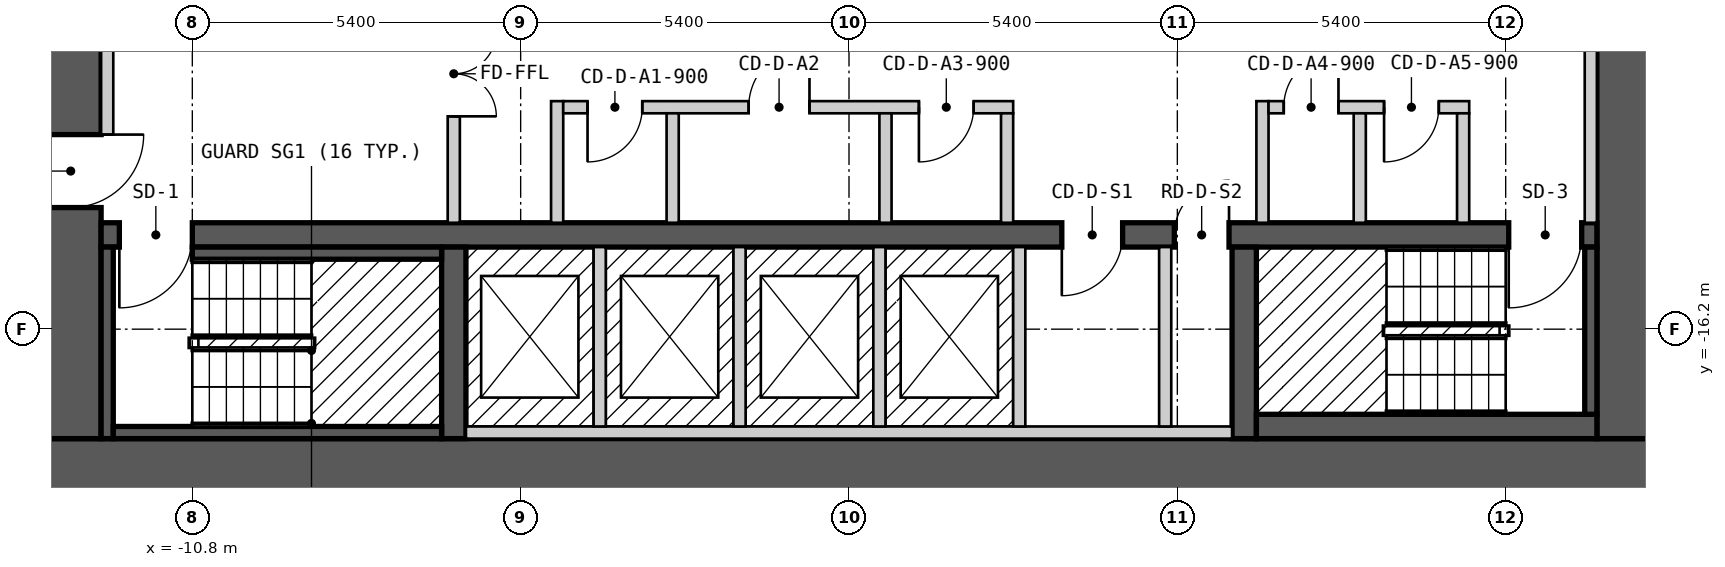
"""IFC4 building model, lengths in metres.
Left out: names, types, materials, properties, quantities, classifications, styles, units other than length and angle.
Written with IfcOpenShell. Run it as: python <this file> out.ifc"""

import sys

from ifc_helpers import new_model, si_unit, direction, frame, frame_2d, origin, place, context, subcontext, project, spatial, rectangle, extrude, element, fill, save


model = new_model("IFC4")
c1 = context("Model", 3, precision=1e-05, world=origin(), true_north=direction((0.0, 1.0)))
c2 = subcontext(c1, "Body", "Model", "MODEL_VIEW")
j1 = project(units=[si_unit("LENGTHUNIT", "METRE"), si_unit("PLANEANGLEUNIT", "RADIAN")], contexts=[c1])
p1 = place(None, origin())
s1 = spatial("IfcSite", under=j1, at=p1, CompositionType="ELEMENT")
p2 = place(p1, origin())
s2 = spatial("IfcBuilding", under=s1, at=p2, CompositionType="ELEMENT")
p3 = place(p2, frame((0.0, 0.0, 93.0)))
s3 = spatial("IfcBuildingStorey", under=s2, at=p3, CompositionType="ELEMENT", Elevation=93.0)
p4 = place(p3, frame((-13.3, -18.5, 0.0), z_axis=(0.0, 0.0, 1.0), x_axis=(1.0, 0.0, 0.0)))
e1 = element("IfcWall", 1, at=p4, inside=s3, PredefinedType="SHEAR", context=c2, shape_type="SweptSolid", body=[
    extrude(rectangle(XDim=26.6, YDim=1.0, at=frame_2d((13.3, 0.0))), origin(), (0.0, 0.0, 1.0), 2.7),
])
p5 = place(p3, frame((-12.8, -18.0, 0.0), z_axis=(0.0, 0.0, 1.0), x_axis=(0.0, 1.0, 0.0)))
e2 = element("IfcWall", 2, at=p5, inside=s3, PredefinedType="SHEAR", context=c2, shape_type="SweptSolid", body=[
    extrude(rectangle(XDim=12.0, YDim=1.0, at=frame_2d((6.0, 0.0))), origin(), (0.0, 0.0, 1.0), 2.7),
])
p6 = place(p5, frame((3.8, 0.0, 0.0)))
e3 = element("IfcOpeningElement", 3, at=p6, cuts=e2, PredefinedType="OPENING", context=c2, shape_type="SweptSolid", body=[
    extrude(rectangle(XDim=1.2, YDim=2.1, at=frame_2d((0.6, 1.05))), frame((0.0, 0.51, 0.0), z_axis=(0.0, -1.0, 0.0), x_axis=(1.0, 0.0, 0.0)), (0.0, 0.0, 1.0), 1.02),
])
p7 = place(p3, frame((12.8, -18.0, 0.0), z_axis=(0.0, 0.0, 1.0), x_axis=(0.0, 1.0, 0.0)))
e4 = element("IfcWall", 4, at=p7, inside=s3, PredefinedType="SHEAR", context=c2, shape_type="SweptSolid", body=[
    extrude(rectangle(XDim=12.0, YDim=1.0, at=frame_2d((6.0, 0.0))), origin(), (0.0, 0.0, 1.0), 2.7),
])
p8 = place(p3, frame((-12.3, -14.65, 0.0), z_axis=(0.0, 0.0, 1.0), x_axis=(1.0, 0.0, 0.0)))
e5 = element("IfcWall", 5, at=p8, inside=s3, PredefinedType="SHEAR", context=c2, shape_type="SweptSolid", body=[
    extrude(rectangle(XDim=24.6, YDim=0.4, at=frame_2d((12.3, 0.0))), origin(), (0.0, 0.0, 1.0), 2.7),
])
p9 = place(p8, frame((1.5, 0.0, 0.0), z_axis=(0.0, 0.0, 1.0), x_axis=(-1.0, 0.0, 0.0)))
e6 = element("IfcOpeningElement", 6, at=p9, cuts=e5, PredefinedType="OPENING", context=c2, shape_type="SweptSolid", body=[
    extrude(rectangle(XDim=1.2, YDim=2.1, at=frame_2d((0.6, 1.05))), frame((0.0, 0.21, 0.0), z_axis=(0.0, -1.0, 0.0), x_axis=(1.0, 0.0, 0.0)), (0.0, 0.0, 1.0), 0.42),
])
p10 = place(p8, frame((24.35, 0.0, 0.0), z_axis=(0.0, 0.0, 1.0), x_axis=(-1.0, 0.0, 0.0)))
e7 = element("IfcOpeningElement", 7, at=p10, cuts=e5, PredefinedType="OPENING", context=c2, shape_type="SweptSolid", body=[
    extrude(rectangle(XDim=1.2, YDim=2.1, at=frame_2d((0.6, 1.05))), frame((0.0, 0.21, 0.0), z_axis=(0.0, -1.0, 0.0), x_axis=(1.0, 0.0, 0.0)), (0.0, 0.0, 1.0), 0.42),
])
p11 = place(p8, frame((16.8, 0.0, 0.0), z_axis=(0.0, 0.0, 1.0), x_axis=(-1.0, 0.0, 0.0)))
e8 = element("IfcOpeningElement", 8, at=p11, cuts=e5, PredefinedType="OPENING", context=c2, shape_type="SweptSolid", body=[
    extrude(rectangle(XDim=1.0, YDim=2.1, at=frame_2d((0.5, 1.05))), frame((0.0, 0.21, 0.0), z_axis=(0.0, -1.0, 0.0), x_axis=(1.0, 0.0, 0.0)), (0.0, 0.0, 1.0), 0.42),
])
p12 = place(p8, frame((18.55, 0.0, 0.0), z_axis=(0.0, 0.0, 1.0), x_axis=(-1.0, 0.0, 0.0)))
e9 = element("IfcOpeningElement", 9, at=p12, cuts=e5, PredefinedType="OPENING", context=c2, shape_type="SweptSolid", body=[
    extrude(rectangle(XDim=0.9, YDim=2.1, at=frame_2d((0.45, 1.05))), frame((0.0, 0.21, 0.0), z_axis=(0.0, -1.0, 0.0), x_axis=(1.0, 0.0, 0.0)), (0.0, 0.0, 1.0), 0.42),
])
for number, where, z_axis, x_axis in (
    (10, (-6.5, -18.0, 0.0), (0.0, 0.0, 1.0), (0.0, 1.0, 0.0)),
    (11, (6.5, -18.0, 0.0), (0.0, 0.0, 1.0), (0.0, 1.0, 0.0)),
):
    element("IfcWall", number, at=place(p3, frame(where, z_axis=z_axis, x_axis=x_axis)), inside=s3, PredefinedType="SHEAR", context=c2, shape_type="SweptSolid", body=[
        extrude(rectangle(XDim=3.15, YDim=0.4, at=frame_2d((1.575, 0.0))), origin(), (0.0, 0.0, 1.0), 2.7),
    ])
p13 = place(p3, frame((-12.2, -18.0, 0.0), z_axis=(0.0, 0.0, 1.0), x_axis=(0.0, 1.0, 0.0)))
e12 = element("IfcWall", 12, at=p13, inside=s3, PredefinedType="SOLIDWALL", context=c2, shape_type="SweptSolid", body=[
    extrude(rectangle(XDim=3.15, YDim=0.2, at=frame_2d((1.575, 0.0))), origin(), (0.0, 0.0, 1.0), 2.7),
])
p14 = place(p3, frame((-12.2, -13.0, 0.0), z_axis=(0.0, 0.0, 1.0), x_axis=(0.0, 1.0, 0.0)))
e13 = element("IfcWall", 13, at=p14, inside=s3, PredefinedType="PARTITIONING", context=c2, shape_type="SweptSolid", body=[
    extrude(rectangle(XDim=3.45, YDim=0.2, at=frame_2d((1.725, 0.0))), origin(), (0.0, 0.0, 1.0), 2.7),
])
p15 = place(p3, frame((-12.1, -17.9, 0.0), z_axis=(0.0, 0.0, 1.0), x_axis=(1.0, 0.0, 0.0)))
e14 = element("IfcWall", 14, at=p15, inside=s3, PredefinedType="SOLIDWALL", context=c2, shape_type="SweptSolid", body=[
    extrude(rectangle(XDim=5.4, YDim=0.2, at=frame_2d((2.7, 0.0))), origin(), (0.0, 0.0, 1.0), 2.7),
])
p16 = place(p3, frame((-10.8, -14.95, 0.0), z_axis=(0.0, 0.0, 1.0), x_axis=(1.0, 0.0, 0.0)))
e15 = element("IfcWall", 15, at=p16, inside=s3, PredefinedType="SOLIDWALL", context=c2, shape_type="SweptSolid", body=[
    extrude(rectangle(XDim=4.1, YDim=0.2, at=frame_2d((2.05, 0.0))), origin(), (0.0, 0.0, 1.0), 2.7),
])
p17 = place(p3, frame((-6.5, -14.45, 0.0), z_axis=(0.0, 0.0, 1.0), x_axis=(0.0, 1.0, 0.0)))
e16 = element("IfcWall", 16, at=p17, inside=s3, PredefinedType="PARTITIONING", context=c2, shape_type="SweptSolid", body=[
    extrude(rectangle(XDim=4.9, YDim=0.2, at=frame_2d((2.45, 0.0))), origin(), (0.0, 0.0, 1.0), 2.7),
])
p18 = place(p17, frame((3.15, 0.0, 0.0), z_axis=(0.0, 0.0, 1.0), x_axis=(-1.0, 0.0, 0.0)))
e17 = element("IfcOpeningElement", 17, at=p18, cuts=e16, PredefinedType="OPENING", context=c2, shape_type="SweptSolid", body=[
    extrude(rectangle(XDim=1.4, YDim=2.1, at=frame_2d((0.7, 1.05))), frame((0.0, 0.11, 0.0), z_axis=(0.0, -1.0, 0.0), x_axis=(1.0, 0.0, 0.0)), (0.0, 0.0, 1.0), 0.22),
])
p19 = place(p3, frame((-6.3, -17.9, 0.0), z_axis=(0.0, 0.0, 1.0), x_axis=(1.0, 0.0, 0.0)))
e18 = element("IfcWall", 18, at=p19, inside=s3, PredefinedType="SOLIDWALL", context=c2, shape_type="SweptSolid", body=[
    extrude(rectangle(XDim=12.6, YDim=0.2, at=frame_2d((6.3, 0.0))), origin(), (0.0, 0.0, 1.0), 2.7),
])
p20 = place(p3, frame((-4.8, -14.45, 0.0), z_axis=(0.0, 0.0, 1.0), x_axis=(0.0, 1.0, 0.0)))
e19 = element("IfcWall", 19, at=p20, inside=s3, PredefinedType="PARTITIONING", context=c2, shape_type="SweptSolid", body=[
    extrude(rectangle(XDim=2.0, YDim=0.2, at=frame_2d((1.0, 0.0))), origin(), (0.0, 0.0, 1.0), 2.7),
])
p21 = place(p3, frame((-4.7, -12.55, 0.0), z_axis=(0.0, 0.0, 1.0), x_axis=(1.0, 0.0, 0.0)))
e20 = element("IfcWall", 20, at=p21, inside=s3, PredefinedType="PARTITIONING", context=c2, shape_type="SweptSolid", body=[
    extrude(rectangle(XDim=7.4, YDim=0.2, at=frame_2d((3.7, 0.0))), origin(), (0.0, 0.0, 1.0), 2.7),
])
p22 = place(p21, frame((1.3, 0.0, 0.0), z_axis=(0.0, 0.0, 1.0), x_axis=(-1.0, 0.0, 0.0)))
e21 = element("IfcOpeningElement", 21, at=p22, cuts=e20, PredefinedType="OPENING", context=c2, shape_type="SweptSolid", body=[
    extrude(rectangle(XDim=0.9, YDim=2.1, at=frame_2d((0.45, 1.05))), frame((0.0, 0.11, 0.0), z_axis=(0.0, -1.0, 0.0), x_axis=(1.0, 0.0, 0.0)), (0.0, 0.0, 1.0), 0.22),
])
p23 = place(p21, frame((4.05, 0.0, 0.0), z_axis=(0.0, 0.0, 1.0), x_axis=(-1.0, 0.0, 0.0)))
e22 = element("IfcOpeningElement", 22, at=p23, cuts=e20, PredefinedType="OPENING", context=c2, shape_type="SweptSolid", body=[
    extrude(rectangle(XDim=1.0, YDim=2.1, at=frame_2d((0.5, 1.05))), frame((0.0, 0.11, 0.0), z_axis=(0.0, -1.0, 0.0), x_axis=(1.0, 0.0, 0.0)), (0.0, 0.0, 1.0), 0.22),
])
p24 = place(p21, frame((6.75, 0.0, 0.0), z_axis=(0.0, 0.0, 1.0), x_axis=(-1.0, 0.0, 0.0)))
e23 = element("IfcOpeningElement", 23, at=p24, cuts=e20, PredefinedType="OPENING", context=c2, shape_type="SweptSolid", body=[
    extrude(rectangle(XDim=0.9, YDim=2.1, at=frame_2d((0.45, 1.05))), frame((0.0, 0.11, 0.0), z_axis=(0.0, -1.0, 0.0), x_axis=(1.0, 0.0, 0.0)), (0.0, 0.0, 1.0), 0.22),
])
p25 = place(p3, frame((-4.1, -17.8, 0.0), z_axis=(0.0, 0.0, 1.0), x_axis=(0.0, 1.0, 0.0)))
e24 = element("IfcWall", 24, at=p25, inside=s3, PredefinedType="SOLIDWALL", context=c2, shape_type="SweptSolid", body=[
    extrude(rectangle(XDim=2.95, YDim=0.2, at=frame_2d((1.475, 0.0))), origin(), (0.0, 0.0, 1.0), 2.7),
])
p26 = place(p3, frame((-2.9, -14.45, 0.0), z_axis=(0.0, 0.0, 1.0), x_axis=(0.0, 1.0, 0.0)))
e25 = element("IfcWall", 25, at=p26, inside=s3, PredefinedType="PARTITIONING", context=c2, shape_type="SweptSolid", body=[
    extrude(rectangle(XDim=1.8, YDim=0.2, at=frame_2d((0.9, 0.0))), origin(), (0.0, 0.0, 1.0), 2.7),
])
for number, where, z_axis, x_axis in (
    (26, (-1.8, -17.8, 0.0), (0.0, 0.0, 1.0), (0.0, 1.0, 0.0)),
    (27, (0.5, -17.8, 0.0), (0.0, 0.0, 1.0), (0.0, 1.0, 0.0)),
):
    element("IfcWall", number, at=place(p3, frame(where, z_axis=z_axis, x_axis=x_axis)), inside=s3, PredefinedType="SOLIDWALL", context=c2, shape_type="SweptSolid", body=[
        extrude(rectangle(XDim=2.95, YDim=0.2, at=frame_2d((1.475, 0.0))), origin(), (0.0, 0.0, 1.0), 2.7),
    ])
for number, where, z_axis, x_axis in (
    (28, (0.6, -14.45, 0.0), (0.0, 0.0, 1.0), (0.0, 1.0, 0.0)),
    (29, (2.6, -14.45, 0.0), (0.0, 0.0, 1.0), (0.0, 1.0, 0.0)),
):
    element("IfcWall", number, at=place(p3, frame(where, z_axis=z_axis, x_axis=x_axis)), inside=s3, PredefinedType="PARTITIONING", context=c2, shape_type="SweptSolid", body=[
        extrude(rectangle(XDim=1.8, YDim=0.2, at=frame_2d((0.9, 0.0))), origin(), (0.0, 0.0, 1.0), 2.7),
    ])
p27 = place(p3, frame((2.8, -17.8, 0.0), z_axis=(0.0, 0.0, 1.0), x_axis=(0.0, 1.0, 0.0)))
e30 = element("IfcWall", 30, at=p27, inside=s3, PredefinedType="SOLIDWALL", context=c2, shape_type="SweptSolid", body=[
    extrude(rectangle(XDim=2.95, YDim=0.2, at=frame_2d((1.475, 0.0))), origin(), (0.0, 0.0, 1.0), 2.7),
])
p28 = place(p3, frame((5.2, -17.8, 0.0), z_axis=(0.0, 0.0, 1.0), x_axis=(0.0, 1.0, 0.0)))
e31 = element("IfcWall", 31, at=p28, inside=s3, PredefinedType="PARTITIONING", context=c2, shape_type="SweptSolid", body=[
    extrude(rectangle(XDim=2.95, YDim=0.2, at=frame_2d((1.475, 0.0))), origin(), (0.0, 0.0, 1.0), 2.7),
])
p29 = place(p3, frame((6.7, -17.8, 0.0), z_axis=(0.0, 0.0, 1.0), x_axis=(1.0, 0.0, 0.0)))
e32 = element("IfcWall", 32, at=p29, inside=s3, PredefinedType="SOLIDWALL", context=c2, shape_type="SweptSolid", body=[
    extrude(rectangle(XDim=5.6, YDim=0.4, at=frame_2d((2.8, 0.0))), origin(), (0.0, 0.0, 1.0), 2.7),
])
p30 = place(p3, frame((6.8, -14.45, 0.0), z_axis=(0.0, 0.0, 1.0), x_axis=(0.0, 1.0, 0.0)))
e33 = element("IfcWall", 33, at=p30, inside=s3, PredefinedType="PARTITIONING", context=c2, shape_type="SweptSolid", body=[
    extrude(rectangle(XDim=2.0, YDim=0.2, at=frame_2d((1.0, 0.0))), origin(), (0.0, 0.0, 1.0), 2.7),
])
p31 = place(p3, frame((6.9, -12.55, 0.0), z_axis=(0.0, 0.0, 1.0), x_axis=(1.0, 0.0, 0.0)))
e34 = element("IfcWall", 34, at=p31, inside=s3, PredefinedType="PARTITIONING", context=c2, shape_type="SweptSolid", body=[
    extrude(rectangle(XDim=3.3, YDim=0.2, at=frame_2d((1.65, 0.0))), origin(), (0.0, 0.0, 1.0), 2.7),
])
p32 = place(p31, frame((1.15, 0.0, 0.0), z_axis=(0.0, 0.0, 1.0), x_axis=(-1.0, 0.0, 0.0)))
e35 = element("IfcOpeningElement", 35, at=p32, cuts=e34, PredefinedType="OPENING", context=c2, shape_type="SweptSolid", body=[
    extrude(rectangle(XDim=0.9, YDim=2.1, at=frame_2d((0.45, 1.05))), frame((0.0, 0.11, 0.0), z_axis=(0.0, -1.0, 0.0), x_axis=(1.0, 0.0, 0.0)), (0.0, 0.0, 1.0), 0.22),
])
p33 = place(p31, frame((2.8, 0.0, 0.0), z_axis=(0.0, 0.0, 1.0), x_axis=(-1.0, 0.0, 0.0)))
e36 = element("IfcOpeningElement", 36, at=p33, cuts=e34, PredefinedType="OPENING", context=c2, shape_type="SweptSolid", body=[
    extrude(rectangle(XDim=0.9, YDim=2.1, at=frame_2d((0.45, 1.05))), frame((0.0, 0.11, 0.0), z_axis=(0.0, -1.0, 0.0), x_axis=(1.0, 0.0, 0.0)), (0.0, 0.0, 1.0), 0.22),
])
for number, where, z_axis, x_axis in (
    (37, (8.4, -14.45, 0.0), (0.0, 0.0, 1.0), (0.0, 1.0, 0.0)),
    (38, (10.1, -14.45, 0.0), (0.0, 0.0, 1.0), (0.0, 1.0, 0.0)),
):
    element("IfcWall", number, at=place(p3, frame(where, z_axis=z_axis, x_axis=x_axis)), inside=s3, PredefinedType="PARTITIONING", context=c2, shape_type="SweptSolid", body=[
        extrude(rectangle(XDim=1.8, YDim=0.2, at=frame_2d((0.9, 0.0))), origin(), (0.0, 0.0, 1.0), 2.7),
    ])
p34 = place(p3, frame((12.2, -17.6, 0.0), z_axis=(0.0, 0.0, 1.0), x_axis=(0.0, 1.0, 0.0)))
e39 = element("IfcWall", 39, at=p34, inside=s3, PredefinedType="SOLIDWALL", context=c2, shape_type="SweptSolid", body=[
    extrude(rectangle(XDim=2.75, YDim=0.2, at=frame_2d((1.375, 0.0))), origin(), (0.0, 0.0, 1.0), 2.7),
])
p35 = place(p3, frame((12.2, -14.45, 0.0), z_axis=(0.0, 0.0, 1.0), x_axis=(0.0, 1.0, 0.0)))
e40 = element("IfcWall", 40, at=p35, inside=s3, PredefinedType="PARTITIONING", context=c2, shape_type="SweptSolid", body=[
    extrude(rectangle(XDim=8.25, YDim=0.2, at=frame_2d((4.125, 0.0))), origin(), (0.0, 0.0, 1.0), 2.7),
])
p36 = place(p9, origin())
e41 = element("IfcDoor", 41, at=p36, inside=s3, OperationType="SINGLE_SWING_RIGHT", PredefinedType="DOOR", context=c2, shape_type="SweptSolid", body=[
    extrude(rectangle(XDim=1.2, YDim=2.1, at=frame_2d((0.6, 1.05))), frame((0.0, 0.025, 0.0), z_axis=(0.0, -1.0, 0.0), x_axis=(1.0, 0.0, 0.0)), (0.0, 0.0, 1.0), 0.05),
])
fill(e6, e41)
p37 = place(p10, origin())
e42 = element("IfcDoor", 42, at=p37, inside=s3, OperationType="SINGLE_SWING_RIGHT", PredefinedType="DOOR", context=c2, shape_type="SweptSolid", body=[
    extrude(rectangle(XDim=1.2, YDim=2.1, at=frame_2d((0.6, 1.05))), frame((0.0, 0.025, 0.0), z_axis=(0.0, -1.0, 0.0), x_axis=(1.0, 0.0, 0.0)), (0.0, 0.0, 1.0), 0.05),
])
fill(e7, e42)
p38 = place(p6, origin())
e43 = element("IfcDoor", 43, at=p38, inside=s3, OperationType="SINGLE_SWING_RIGHT", PredefinedType="DOOR", context=c2, shape_type="SweptSolid", body=[
    extrude(rectangle(XDim=1.2, YDim=2.1, at=frame_2d((0.6, 1.05))), frame((0.0, 0.025, 0.0), z_axis=(0.0, -1.0, 0.0), x_axis=(1.0, 0.0, 0.0)), (0.0, 0.0, 1.0), 0.05),
])
fill(e3, e43)
p39 = place(p18, origin())
e44 = element("IfcDoor", 44, at=p39, inside=s3, OperationType="DOUBLE_DOOR_SINGLE_SWING", PredefinedType="DOOR", context=c2, shape_type="SweptSolid", body=[
    extrude(rectangle(XDim=1.4, YDim=2.1, at=frame_2d((0.7, 1.05))), frame((0.0, 0.025, 0.0), z_axis=(0.0, -1.0, 0.0), x_axis=(1.0, 0.0, 0.0)), (0.0, 0.0, 1.0), 0.05),
])
fill(e17, e44)
p40 = place(p22, origin())
e45 = element("IfcDoor", 45, at=p40, inside=s3, OperationType="SINGLE_SWING_RIGHT", PredefinedType="DOOR", context=c2, shape_type="SweptSolid", body=[
    extrude(rectangle(XDim=0.9, YDim=2.1, at=frame_2d((0.45, 1.05))), frame((0.0, 0.025, 0.0), z_axis=(0.0, -1.0, 0.0), x_axis=(1.0, 0.0, 0.0)), (0.0, 0.0, 1.0), 0.05),
])
fill(e21, e45)
p41 = place(p23, origin())
e46 = element("IfcDoor", 46, at=p41, inside=s3, OperationType="SINGLE_SWING_LEFT", PredefinedType="DOOR", context=c2, shape_type="SweptSolid", body=[
    extrude(rectangle(XDim=1.0, YDim=2.1, at=frame_2d((0.5, 1.05))), frame((0.0, 0.025, 0.0), z_axis=(0.0, -1.0, 0.0), x_axis=(1.0, 0.0, 0.0)), (0.0, 0.0, 1.0), 0.05),
])
fill(e22, e46)
p42 = place(p24, origin())
e47 = element("IfcDoor", 47, at=p42, inside=s3, OperationType="SINGLE_SWING_RIGHT", PredefinedType="DOOR", context=c2, shape_type="SweptSolid", body=[
    extrude(rectangle(XDim=0.9, YDim=2.1, at=frame_2d((0.45, 1.05))), frame((0.0, 0.025, 0.0), z_axis=(0.0, -1.0, 0.0), x_axis=(1.0, 0.0, 0.0)), (0.0, 0.0, 1.0), 0.05),
])
fill(e23, e47)
p43 = place(p32, origin())
e48 = element("IfcDoor", 48, at=p43, inside=s3, OperationType="SINGLE_SWING_LEFT", PredefinedType="DOOR", context=c2, shape_type="SweptSolid", body=[
    extrude(rectangle(XDim=0.9, YDim=2.1, at=frame_2d((0.45, 1.05))), frame((0.0, 0.025, 0.0), z_axis=(0.0, -1.0, 0.0), x_axis=(1.0, 0.0, 0.0)), (0.0, 0.0, 1.0), 0.05),
])
fill(e35, e48)
p44 = place(p33, origin())
e49 = element("IfcDoor", 49, at=p44, inside=s3, OperationType="SINGLE_SWING_RIGHT", PredefinedType="DOOR", context=c2, shape_type="SweptSolid", body=[
    extrude(rectangle(XDim=0.9, YDim=2.1, at=frame_2d((0.45, 1.05))), frame((0.0, 0.025, 0.0), z_axis=(0.0, -1.0, 0.0), x_axis=(1.0, 0.0, 0.0)), (0.0, 0.0, 1.0), 0.05),
])
fill(e36, e49)
p45 = place(p11, origin())
e50 = element("IfcDoor", 50, at=p45, inside=s3, OperationType="SINGLE_SWING_RIGHT", PredefinedType="DOOR", context=c2, shape_type="SweptSolid", body=[
    extrude(rectangle(XDim=1.0, YDim=2.1, at=frame_2d((0.5, 1.05))), frame((0.0, 0.025, 0.0), z_axis=(0.0, -1.0, 0.0), x_axis=(1.0, 0.0, 0.0)), (0.0, 0.0, 1.0), 0.05),
])
fill(e8, e50)
p46 = place(p12, origin())
e51 = element("IfcDoor", 51, at=p46, inside=s3, OperationType="SINGLE_SWING_LEFT", PredefinedType="DOOR", context=c2, shape_type="SweptSolid", body=[
    extrude(rectangle(XDim=0.9, YDim=2.1, at=frame_2d((0.45, 1.05))), frame((0.0, 0.025, 0.0), z_axis=(0.0, -1.0, 0.0), x_axis=(1.0, 0.0, 0.0)), (0.0, 0.0, 1.0), 0.05),
])
fill(e9, e51)
save(model, sys.argv[1])
